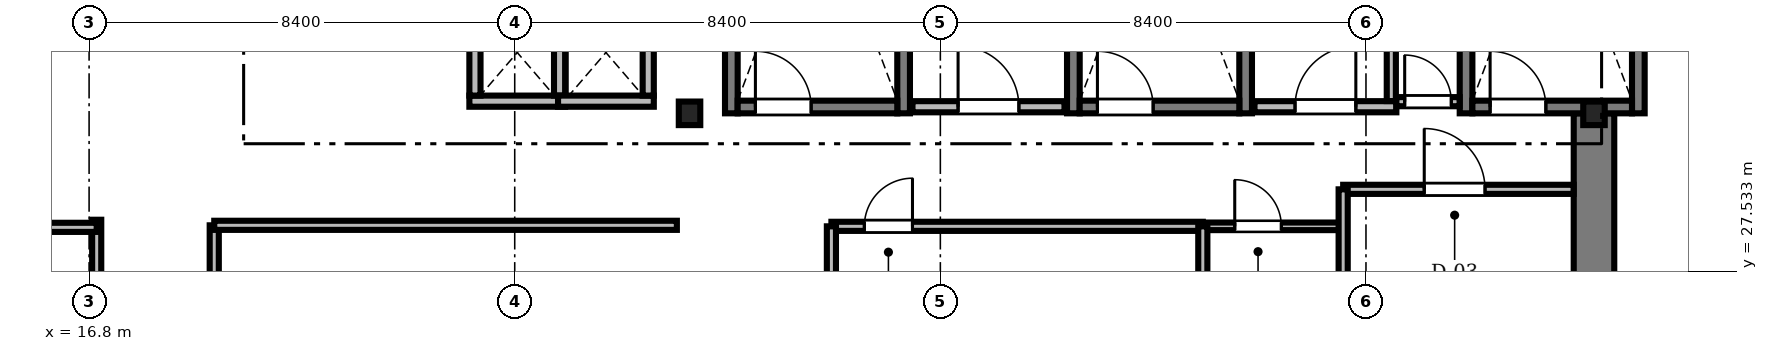
"""IFC4 building model, lengths in metres.
Left out: names, types, materials, properties, quantities, classifications, styles, units other than length and angle.
Written with IfcOpenShell. Run it as: python <this file> out.ifc"""

import sys

from ifc_helpers import new_model, si_unit, direction, frame, frame_2d, origin, origin_2d, place, context, subcontext, project, spatial, rectangle, i_section, extrude, source, transform, mapped, element, fill, save


model = new_model("IFC4")
c1 = context("Model", 3, precision=1e-05, world=origin(), true_north=direction((0.0, 1.0)))
c2 = subcontext(c1, "Body", "Model", "MODEL_VIEW")
j1 = project(units=[si_unit("LENGTHUNIT", "METRE"), si_unit("PLANEANGLEUNIT", "RADIAN")], contexts=[c1])
p1 = place(None, origin())
s1 = spatial("IfcSite", under=j1, at=p1, CompositionType="ELEMENT")
p2 = place(p1, origin())
s2 = spatial("IfcBuilding", under=s1, at=p2, CompositionType="ELEMENT")
p3 = place(p2, frame((0.0, 0.0, 163.1)))
s3 = spatial("IfcBuildingStorey", under=s2, at=p3, CompositionType="ELEMENT", Elevation=163.1)
m1 = source(origin(), c2, "Body", "SweptSolid", [
    extrude(rectangle(XDim=13.15, YDim=0.8, at=frame_2d((6.575, 0.0))), origin(), (0.0, 0.0, 1.0), 3.05),
])
p4 = place(p3, frame((46.5, 17.5, 0.0), z_axis=(0.0, 0.0, 1.0), x_axis=(0.0, 1.0, 0.0)))
e1 = element("IfcWall", 1, at=p4, inside=s3, PredefinedType="SHEAR", context=c2, shape_type="MappedRepresentation", body=[
    mapped(m1, transform((0.0, 0.0, 0.0), scale=1.0)),
])
m2 = source(origin(), c2, "Body", "SweptSolid", [
    extrude(i_section(OverallWidth=0.424, OverallDepth=0.465, WebThickness=0.035, FlangeThickness=0.056, FilletRadius=0.015, at=origin_2d()), origin(), (0.0, 0.0, 1.0), 3.05),
])
for number, where, z_axis, x_axis in (
    (2, (28.65, 30.65, 0.0), (0.0, 0.0, 1.0), (1.0, 0.0, 0.0)),
    (3, (46.5, 30.65, 0.0), (0.0, 0.0, 1.0), (1.0, 0.0, 0.0)),
):
    element("IfcColumn", number, at=place(p3, frame(where, z_axis=z_axis, x_axis=x_axis)), inside=s3, PredefinedType="COLUMN", context=c2, shape_type="MappedRepresentation", body=[
        mapped(m2, transform((0.0, 0.0, 0.0), scale=1.0)),
    ])
m3 = source(origin(), c2, "Body", "SweptSolid", [
    extrude(rectangle(XDim=9.25, YDim=0.25, at=frame_2d((4.625, 0.0))), origin(), (0.0, 0.0, 1.0), 3.5),
])
for number, where, z_axis, x_axis in (
    (4, (29.475, 30.65, 0.0), (0.0, 0.0, 1.0), (0.0, 1.0, 0.0)),
    (5, (32.875, 30.65, 0.0), (0.0, 0.0, 1.0), (0.0, 1.0, 0.0)),
):
    element("IfcWall", number, at=place(p3, frame(where, z_axis=z_axis, x_axis=x_axis)), inside=s3, PredefinedType="SOLIDWALL", context=c2, shape_type="MappedRepresentation", body=[
        mapped(m3, transform((0.0, 0.0, 0.0), scale=1.0)),
    ])
m4 = source(origin(), c2, "Body", "SweptSolid", [
    extrude(rectangle(XDim=3.15, YDim=0.25, at=frame_2d((1.575, 0.0))), origin(), (0.0, 0.0, 1.0), 3.5),
])
p5 = place(p3, frame((29.6, 30.775, 0.0), z_axis=(0.0, 0.0, 1.0), x_axis=(1.0, 0.0, 0.0)))
e6 = element("IfcWall", 6, at=p5, inside=s3, PredefinedType="SOLIDWALL", context=c2, shape_type="MappedRepresentation", body=[
    mapped(m4, transform((0.0, 0.0, 0.0), scale=1.0)),
])
m5 = source(origin(), c2, "Body", "SweptSolid", [
    extrude(rectangle(XDim=1.1, YDim=2.2, at=frame_2d((0.55, 1.1))), frame((0.0, 0.135, 0.0), z_axis=(0.0, -1.0, 0.0), x_axis=(1.0, 0.0, 0.0)), (0.0, 0.0, 1.0), 0.27),
])
p6 = place(p5, frame((0.35, 0.0, 0.0)))
e7 = element("IfcOpeningElement", 7, at=p6, cuts=e6, PredefinedType="OPENING", context=c2, shape_type="MappedRepresentation", body=[
    mapped(m5, transform((0.0, 0.0, 0.0), scale=1.0)),
])
for number, where, z_axis, x_axis in (
    (8, (36.225, 30.65, 0.0), (0.0, 0.0, 1.0), (0.0, 1.0, 0.0)),
    (9, (39.625, 30.65, 0.0), (0.0, 0.0, 1.0), (0.0, 1.0, 0.0)),
):
    element("IfcWall", number, at=place(p3, frame(where, z_axis=z_axis, x_axis=x_axis)), inside=s3, PredefinedType="SOLIDWALL", context=c2, shape_type="MappedRepresentation", body=[
        mapped(m3, transform((0.0, 0.0, 0.0), scale=1.0)),
    ])
p7 = place(p3, frame((36.35, 30.775, 0.0), z_axis=(0.0, 0.0, 1.0), x_axis=(1.0, 0.0, 0.0)))
e10 = element("IfcWall", 10, at=p7, inside=s3, PredefinedType="SOLIDWALL", context=c2, shape_type="MappedRepresentation", body=[
    mapped(m4, transform((0.0, 0.0, 0.0), scale=1.0)),
])
p8 = place(p7, frame((0.35, 0.0, 0.0)))
e11 = element("IfcOpeningElement", 11, at=p8, cuts=e10, PredefinedType="OPENING", context=c2, shape_type="MappedRepresentation", body=[
    mapped(m5, transform((0.0, 0.0, 0.0), scale=1.0)),
])
for number, where, z_axis, x_axis in (
    (12, (43.975, 30.65, 0.0), (0.0, 0.0, 1.0), (0.0, 1.0, 0.0)),
    (13, (47.375, 30.65, 0.0), (0.0, 0.0, 1.0), (0.0, 1.0, 0.0)),
):
    element("IfcWall", number, at=place(p3, frame(where, z_axis=z_axis, x_axis=x_axis)), inside=s3, PredefinedType="SOLIDWALL", context=c2, shape_type="MappedRepresentation", body=[
        mapped(m3, transform((0.0, 0.0, 0.0), scale=1.0)),
    ])
p9 = place(p3, frame((44.1, 30.775, 0.0), z_axis=(0.0, 0.0, 1.0), x_axis=(1.0, 0.0, 0.0)))
e14 = element("IfcWall", 14, at=p9, inside=s3, PredefinedType="SOLIDWALL", context=c2, shape_type="MappedRepresentation", body=[
    mapped(m4, transform((0.0, 0.0, 0.0), scale=1.0)),
])
p10 = place(p9, frame((0.35, 0.0, 0.0)))
e15 = element("IfcOpeningElement", 15, at=p10, cuts=e14, PredefinedType="OPENING", context=c2, shape_type="MappedRepresentation", body=[
    mapped(m5, transform((0.0, 0.0, 0.0), scale=1.0)),
])
m6 = source(origin(), c2, "Body", "SweptSolid", [
    extrude(rectangle(XDim=3.0, YDim=0.22, at=frame_2d((1.5, 0.0))), origin(), (0.0, 0.0, 1.0), 3.05),
])
p11 = place(p3, frame((33.05, 30.78, 0.0), z_axis=(0.0, 0.0, 1.0), x_axis=(1.0, 0.0, 0.0)))
e16 = element("IfcWall", 16, at=p11, inside=s3, PredefinedType="SOLIDWALL", context=c2, shape_type="MappedRepresentation", body=[
    mapped(m6, transform((0.0, 0.0, 0.0), scale=1.0)),
])
m7 = source(origin(), c2, "Body", "SweptSolid", [
    extrude(rectangle(XDim=1.2, YDim=2.2, at=frame_2d((0.6, 1.1))), frame((0.0, 0.12, 0.0), z_axis=(0.0, -1.0, 0.0), x_axis=(1.0, 0.0, 0.0)), (0.0, 0.0, 1.0), 0.24),
])
p12 = place(p11, frame((0.9, 0.0, 0.0)))
e17 = element("IfcOpeningElement", 17, at=p12, cuts=e16, PredefinedType="OPENING", context=c2, shape_type="MappedRepresentation", body=[
    mapped(m7, transform((0.0, 0.0, 0.0), scale=1.0)),
])
m8 = source(origin(), c2, "Body", "SweptSolid", [
    extrude(rectangle(XDim=2.8, YDim=0.22, at=frame_2d((1.4, 0.0))), origin(), (0.0, 0.0, 1.0), 3.05),
])
p13 = place(p3, frame((39.8, 30.78, 0.0), z_axis=(0.0, 0.0, 1.0), x_axis=(1.0, 0.0, 0.0)))
e18 = element("IfcWall", 18, at=p13, inside=s3, PredefinedType="SOLIDWALL", context=c2, shape_type="MappedRepresentation", body=[
    mapped(m8, transform((0.0, 0.0, 0.0), scale=1.0)),
])
p14 = place(p13, frame((0.8, 0.0, 0.0)))
e19 = element("IfcOpeningElement", 19, at=p14, cuts=e18, PredefinedType="OPENING", context=c2, shape_type="MappedRepresentation", body=[
    mapped(m7, transform((0.0, 0.0, 0.0), scale=1.0)),
])
m9 = source(origin(), c2, "Body", "SweptSolid", [
    extrude(rectangle(XDim=1.89, YDim=0.22, at=frame_2d((0.945, 0.0))), origin(), (0.0, 0.0, 1.0), 3.05),
])
p15 = place(p3, frame((24.305, 30.89, 0.0), z_axis=(0.0, 0.0, 1.0), x_axis=(1.0, 0.0, 0.0)))
e20 = element("IfcWall", 20, at=p15, inside=s3, PredefinedType="SOLIDWALL", context=c2, shape_type="MappedRepresentation", body=[
    mapped(m9, transform((0.0, 0.0, 0.0), scale=1.0)),
])
m10 = source(origin(), c2, "Body", "SweptSolid", [
    extrude(rectangle(XDim=1.7, YDim=0.22, at=frame_2d((0.85, 0.0))), origin(), (0.0, 0.0, 1.0), 3.05),
])
for number, where, z_axis, x_axis in (
    (21, (24.415, 31.0, 0.0), (0.0, 0.0, 1.0), (0.0, 1.0, 0.0)),
    (22, (26.085, 31.0, 0.0), (0.0, 0.0, 1.0), (0.0, 1.0, 0.0)),
):
    element("IfcWall", number, at=place(p3, frame(where, z_axis=z_axis, x_axis=x_axis)), inside=s3, PredefinedType="SOLIDWALL", context=c2, shape_type="MappedRepresentation", body=[
        mapped(m10, transform((0.0, 0.0, 0.0), scale=1.0)),
    ])
p16 = place(p3, frame((26.055, 30.89, 0.0), z_axis=(0.0, 0.0, 1.0), x_axis=(1.0, 0.0, 0.0)))
e23 = element("IfcWall", 23, at=p16, inside=s3, PredefinedType="SOLIDWALL", context=c2, shape_type="MappedRepresentation", body=[
    mapped(m9, transform((0.0, 0.0, 0.0), scale=1.0)),
])
p17 = place(p3, frame((27.835, 31.0, 0.0), z_axis=(0.0, 0.0, 1.0), x_axis=(0.0, 1.0, 0.0)))
e24 = element("IfcWall", 24, at=p17, inside=s3, PredefinedType="SOLIDWALL", context=c2, shape_type="MappedRepresentation", body=[
    mapped(m10, transform((0.0, 0.0, 0.0), scale=1.0)),
])
m11 = source(origin(), c2, "Body", "SweptSolid", [
    extrude(rectangle(XDim=11.94, YDim=0.18, at=frame_2d((5.97, 0.0))), origin(), (0.0, 0.0, 1.0), 2.492),
])
p18 = place(p3, frame((19.27, 16.5, 0.0), z_axis=(0.0, 0.0, 1.0), x_axis=(0.0, 1.0, 0.0)))
e25 = element("IfcWall", 25, at=p18, inside=s3, PredefinedType="PARTITIONING", context=c2, shape_type="MappedRepresentation", body=[
    mapped(m11, transform((0.0, 0.0, 0.0), scale=1.0)),
])
m12 = source(origin(), c2, "Body", "SweptSolid", [
    extrude(rectangle(XDim=1.05, YDim=2.2, at=frame_2d((0.525, 1.1))), frame((0.0, 0.1, 0.0), z_axis=(0.0, -1.0, 0.0), x_axis=(1.0, 0.0, 0.0)), (0.0, 0.0, 1.0), 0.2),
])
p19 = place(p18, frame((4.5, 0.0, 0.0)))
e26 = element("IfcOpeningElement", 26, at=p19, cuts=e25, PredefinedType="OPENING", context=c2, shape_type="MappedRepresentation", body=[
    mapped(m12, transform((0.0, 0.0, 0.0), scale=1.0)),
])
m13 = source(origin(), c2, "Body", "SweptSolid", [
    extrude(rectangle(XDim=7.33, YDim=0.18, at=frame_2d((3.665, 0.0))), origin(), (0.0, 0.0, 1.0), 2.682),
])
p20 = place(p3, frame((31.45, 28.42, 0.0), z_axis=(0.0, 0.0, 1.0), x_axis=(1.0, 0.0, 0.0)))
e27 = element("IfcWall", 27, at=p20, inside=s3, PredefinedType="PARTITIONING", context=c2, shape_type="MappedRepresentation", body=[
    mapped(m13, transform((0.0, 0.0, 0.0), scale=1.0)),
])
m14 = source(origin(), c2, "Body", "SweptSolid", [
    extrude(rectangle(XDim=0.95, YDim=2.15, at=frame_2d((0.475, 1.075))), frame((0.0, 0.1, 0.0), z_axis=(0.0, -1.0, 0.0), x_axis=(1.0, 0.0, 0.0)), (0.0, 0.0, 1.0), 0.2),
])
p21 = place(p20, frame((0.65, 0.0, 0.0)))
e28 = element("IfcOpeningElement", 28, at=p21, cuts=e27, PredefinedType="OPENING", context=c2, shape_type="MappedRepresentation", body=[
    mapped(m14, transform((0.0, 0.0, 0.0), scale=1.0)),
])
m15 = source(origin(), c2, "Body", "SweptSolid", [
    extrude(rectangle(XDim=4.548, YDim=0.18, at=frame_2d((2.274, 0.0))), origin(), (0.0, 0.0, 1.0), 2.682),
])
p22 = place(p3, frame((41.55, 29.15, 0.0), z_axis=(0.0, 0.0, 1.0), x_axis=(1.0, 0.0, 0.0)))
e29 = element("IfcWall", 29, at=p22, inside=s3, PredefinedType="PARTITIONING", context=c2, shape_type="MappedRepresentation", body=[
    mapped(m15, transform((0.0, 0.0, 0.0), scale=1.0)),
])
m16 = source(origin(), c2, "Body", "SweptSolid", [
    extrude(rectangle(XDim=1.2, YDim=2.2, at=frame_2d((0.6, 1.1))), frame((0.0, 0.1, 0.0), z_axis=(0.0, -1.0, 0.0), x_axis=(1.0, 0.0, 0.0)), (0.0, 0.0, 1.0), 0.2),
])
p23 = place(p22, frame((1.6, 0.0, 0.0)))
e30 = element("IfcOpeningElement", 30, at=p23, cuts=e29, PredefinedType="OPENING", context=c2, shape_type="MappedRepresentation", body=[
    mapped(m16, transform((0.0, 0.0, 0.0), scale=1.0)),
])
m17 = source(origin(), c2, "Body", "SweptSolid", [
    extrude(rectangle(XDim=2.74, YDim=0.15, at=frame_2d((1.37, 0.0))), origin(), (0.0, 0.0, 1.0), 3.05),
])
p24 = place(p3, frame((38.78, 28.42, 0.0), z_axis=(0.0, 0.0, 1.0), x_axis=(1.0, 0.0, 0.0)))
e31 = element("IfcWall", 31, at=p24, inside=s3, PredefinedType="PARTITIONING", context=c2, shape_type="MappedRepresentation", body=[
    mapped(m17, transform((0.0, 0.0, 0.0), scale=1.0)),
])
m18 = source(origin(), c2, "Body", "SweptSolid", [
    extrude(rectangle(XDim=0.92, YDim=2.1, at=frame_2d((0.46, 1.05))), frame((0.0, 0.085, 0.0), z_axis=(0.0, -1.0, 0.0), x_axis=(1.0, 0.0, 0.0)), (0.0, 0.0, 1.0), 0.17),
])
p25 = place(p24, frame((0.63, 0.0, 0.0)))
e32 = element("IfcOpeningElement", 32, at=p25, cuts=e31, PredefinedType="OPENING", context=c2, shape_type="MappedRepresentation", body=[
    mapped(m18, transform((0.0, 0.0, 0.0), scale=1.0)),
])
m19 = source(origin(), c2, "Body", "SweptSolid", [
    extrude(rectangle(XDim=1.248, YDim=0.18, at=frame_2d((0.624, 0.0))), origin(), (0.0, 0.0, 1.0), 3.05),
])
p26 = place(p3, frame((42.6, 30.88, 0.0), z_axis=(0.0, 0.0, 1.0), x_axis=(1.0, 0.0, 0.0)))
e33 = element("IfcWall", 33, at=p26, inside=s3, PredefinedType="PARTITIONING", context=c2, shape_type="MappedRepresentation", body=[
    mapped(m19, transform((0.0, 0.0, 0.0), scale=1.0)),
])
m20 = source(origin(), c2, "Body", "SweptSolid", [
    extrude(rectangle(XDim=0.92, YDim=2.1, at=frame_2d((0.46, 1.05))), frame((0.0, 0.1, 0.0), z_axis=(0.0, -1.0, 0.0), x_axis=(1.0, 0.0, 0.0)), (0.0, 0.0, 1.0), 0.2),
])
p27 = place(p26, frame((0.164, 0.0, 0.0)))
e34 = element("IfcOpeningElement", 34, at=p27, cuts=e33, PredefinedType="OPENING", context=c2, shape_type="MappedRepresentation", body=[
    mapped(m20, transform((0.0, 0.0, 0.0), scale=1.0)),
])
m21 = source(origin(), c2, "Body", "SweptSolid", [
    extrude(rectangle(XDim=14.2, YDim=0.18, at=frame_2d((7.1, 0.0))), origin(), (0.0, 0.0, 1.0), 2.492),
])
p28 = place(p3, frame((16.95, 14.35, 0.0), z_axis=(0.0, 0.0, 1.0), x_axis=(0.0, 1.0, 0.0)))
e35 = element("IfcWall", 35, at=p28, inside=s3, PredefinedType="PARTITIONING", context=c2, shape_type="MappedRepresentation", body=[
    mapped(m21, transform((0.0, 0.0, 0.0), scale=1.0)),
])
m22 = source(origin(), c2, "Body", "SweptSolid", [
    extrude(rectangle(XDim=10.22, YDim=0.18, at=frame_2d((5.11, 0.0))), origin(), (0.0, 0.0, 1.0), 2.326),
])
p29 = place(p3, frame((6.73, 28.4, 0.0), z_axis=(0.0, 0.0, 1.0), x_axis=(1.0, 0.0, 0.0)))
e36 = element("IfcWall", 36, at=p29, inside=s3, PredefinedType="PARTITIONING", context=c2, shape_type="MappedRepresentation", body=[
    mapped(m22, transform((0.0, 0.0, 0.0), scale=1.0)),
])
m23 = source(origin(), c2, "Body", "SweptSolid", [
    extrude(rectangle(XDim=9.13, YDim=0.18, at=frame_2d((4.565, 0.0))), origin(), (0.0, 0.0, 1.0), 3.05),
])
p30 = place(p3, frame((19.27, 28.44, 0.0), z_axis=(0.0, 0.0, 1.0), x_axis=(1.0, 0.0, 0.0)))
e37 = element("IfcWall", 37, at=p30, inside=s3, PredefinedType="PARTITIONING", context=c2, shape_type="MappedRepresentation", body=[
    mapped(m23, transform((0.0, 0.0, 0.0), scale=1.0)),
])
m24 = source(origin(), c2, "Body", "SweptSolid", [
    extrude(rectangle(XDim=2.758, YDim=0.18, at=frame_2d((1.379, 0.0))), origin(), (0.0, 0.0, 1.0), 3.05),
])
p31 = place(p3, frame((42.5, 30.892, 0.0), z_axis=(0.0, 0.0, 1.0), x_axis=(0.0, 1.0, 0.0)))
e38 = element("IfcWall", 38, at=p31, inside=s3, PredefinedType="PARTITIONING", context=c2, shape_type="MappedRepresentation", body=[
    mapped(m24, transform((0.0, 0.0, 0.0), scale=1.0)),
])
m25 = source(origin(), c2, "Body", "SweptSolid", [
    extrude(rectangle(XDim=2.35, YDim=0.18, at=frame_2d((1.175, 0.0))), origin(), (0.0, 0.0, 1.0), 2.492),
])
p32 = place(p3, frame((41.55, 26.8, 0.0), z_axis=(0.0, 0.0, 1.0), x_axis=(0.0, 1.0, 0.0)))
e39 = element("IfcWall", 39, at=p32, inside=s3, PredefinedType="PARTITIONING", context=c2, shape_type="MappedRepresentation", body=[
    mapped(m25, transform((0.0, 0.0, 0.0), scale=1.0)),
])
m26 = source(origin(), c2, "Body", "SweptSolid", [
    extrude(rectangle(XDim=1.6, YDim=0.18, at=frame_2d((0.8, 0.0))), origin(), (0.0, 0.0, 1.0), 2.592),
])
for number, where, z_axis, x_axis in (
    (40, (31.45, 26.82, 0.0), (0.0, 0.0, 1.0), (0.0, 1.0, 0.0)),
    (41, (38.78, 26.82, 0.0), (0.0, 0.0, 1.0), (0.0, 1.0, 0.0)),
):
    element("IfcWall", number, at=place(p3, frame(where, z_axis=z_axis, x_axis=x_axis)), inside=s3, PredefinedType="PARTITIONING", context=c2, shape_type="MappedRepresentation", body=[
        mapped(m26, transform((0.0, 0.0, 0.0), scale=1.0)),
    ])
m27 = source(origin(), c2, "Body", "SweptSolid", [
    extrude(rectangle(XDim=1.1, YDim=2.2, at=frame_2d((0.55, 1.1))), frame((0.0, 0.025, 0.0), z_axis=(0.0, -1.0, 0.0), x_axis=(1.0, 0.0, 0.0)), (0.0, 0.0, 1.0), 0.05),
])
p33 = place(p6, origin())
e42 = element("IfcDoor", 42, at=p33, inside=s3, OperationType="SINGLE_SWING_LEFT", PredefinedType="DOOR", context=c2, shape_type="MappedRepresentation", body=[
    mapped(m27, transform((0.0, 0.0, 0.0), scale=1.0)),
])
fill(e7, e42)
p34 = place(p8, origin())
e43 = element("IfcDoor", 43, at=p34, inside=s3, OperationType="SINGLE_SWING_LEFT", PredefinedType="DOOR", context=c2, shape_type="MappedRepresentation", body=[
    mapped(m27, transform((0.0, 0.0, 0.0), scale=1.0)),
])
fill(e11, e43)
p35 = place(p10, origin())
e44 = element("IfcDoor", 44, at=p35, inside=s3, OperationType="SINGLE_SWING_LEFT", PredefinedType="DOOR", context=c2, shape_type="MappedRepresentation", body=[
    mapped(m27, transform((0.0, 0.0, 0.0), scale=1.0)),
])
fill(e15, e44)
m28 = source(origin(), c2, "Body", "SweptSolid", [
    extrude(rectangle(XDim=1.2, YDim=2.2, at=frame_2d((0.6, 1.1))), frame((0.0, 0.025, 0.0), z_axis=(0.0, -1.0, 0.0), x_axis=(1.0, 0.0, 0.0)), (0.0, 0.0, 1.0), 0.05),
])
p36 = place(p12, origin())
e45 = element("IfcDoor", 45, at=p36, inside=s3, OperationType="SINGLE_SWING_LEFT", PredefinedType="DOOR", context=c2, shape_type="MappedRepresentation", body=[
    mapped(m28, transform((0.0, 0.0, 0.0), scale=1.0)),
])
fill(e17, e45)
p37 = place(p14, origin())
e46 = element("IfcDoor", 46, at=p37, inside=s3, OperationType="SINGLE_SWING_RIGHT", PredefinedType="DOOR", context=c2, shape_type="MappedRepresentation", body=[
    mapped(m28, transform((0.0, 0.0, 0.0), scale=1.0)),
])
fill(e19, e46)
m29 = source(origin(), c2, "Body", "SweptSolid", [
    extrude(rectangle(XDim=0.95, YDim=2.15, at=frame_2d((0.475, 1.075))), frame((0.0, 0.025, 0.0), z_axis=(0.0, -1.0, 0.0), x_axis=(1.0, 0.0, 0.0)), (0.0, 0.0, 1.0), 0.05),
])
p38 = place(p21, origin())
e47 = element("IfcDoor", 47, at=p38, inside=s3, OperationType="SINGLE_SWING_RIGHT", PredefinedType="DOOR", context=c2, shape_type="MappedRepresentation", body=[
    mapped(m29, transform((0.0, 0.0, 0.0), scale=1.0)),
])
fill(e28, e47)
p39 = place(p23, origin())
e48 = element("IfcDoor", 48, at=p39, inside=s3, OperationType="SINGLE_SWING_LEFT", PredefinedType="DOOR", context=c2, shape_type="MappedRepresentation", body=[
    mapped(m28, transform((0.0, 0.0, 0.0), scale=1.0)),
])
fill(e30, e48)
m30 = source(origin(), c2, "Body", "SweptSolid", [
    extrude(rectangle(XDim=0.92, YDim=2.1, at=frame_2d((0.46, 1.05))), frame((0.0, 0.025, 0.0), z_axis=(0.0, -1.0, 0.0), x_axis=(1.0, 0.0, 0.0)), (0.0, 0.0, 1.0), 0.05),
])
p40 = place(p25, origin())
e49 = element("IfcDoor", 49, at=p40, inside=s3, OperationType="SINGLE_SWING_LEFT", PredefinedType="DOOR", context=c2, shape_type="MappedRepresentation", body=[
    mapped(m30, transform((0.0, 0.0, 0.0), scale=1.0)),
])
fill(e32, e49)
p41 = place(p27, origin())
e50 = element("IfcDoor", 50, at=p41, inside=s3, OperationType="SINGLE_SWING_LEFT", PredefinedType="DOOR", context=c2, shape_type="MappedRepresentation", body=[
    mapped(m30, transform((0.0, 0.0, 0.0), scale=1.0)),
])
fill(e34, e50)
save(model, sys.argv[1])
